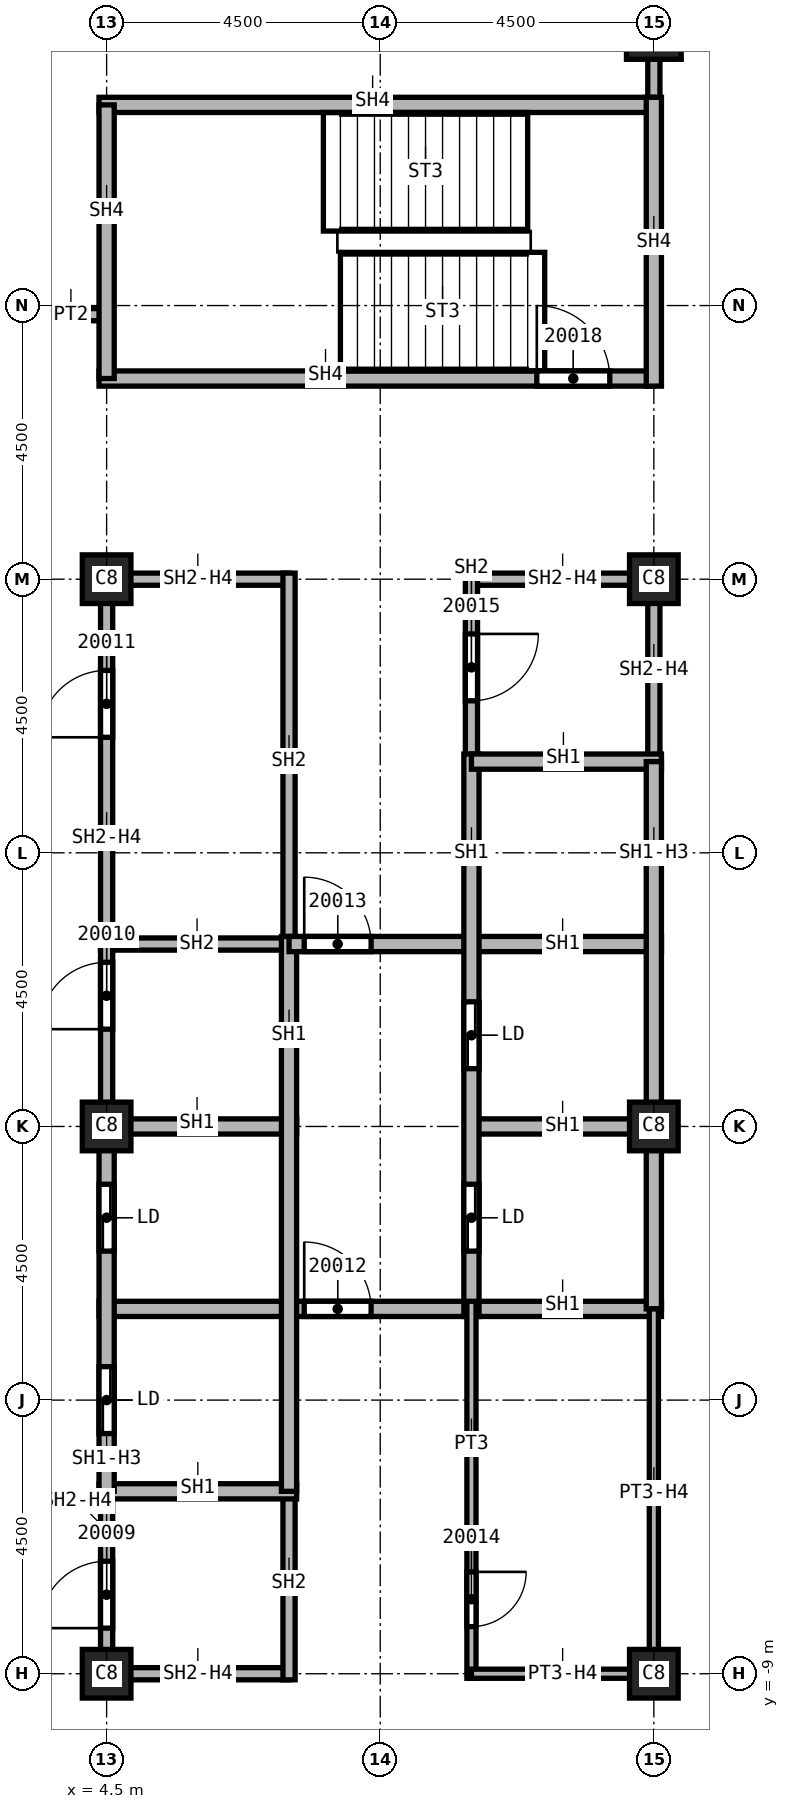
"""IFC4 building model, lengths in metres.
Left out: names, types, materials, properties, quantities, classifications, styles, units other than length and angle.
Written with IfcOpenShell. Run it as: python <this file> out.ifc"""

import sys

from ifc_helpers import new_model, si_unit, direction, frame, frame_2d, origin, origin_2d, place, context, subcontext, project, spatial, rectangle, extrude, element, fill, save


model = new_model("IFC4")
c1 = context("Model", 3, precision=1e-05, world=origin(), true_north=direction((0.0, 1.0)))
c2 = subcontext(c1, "Body", "Model", "MODEL_VIEW")
j1 = project(units=[si_unit("LENGTHUNIT", "METRE"), si_unit("PLANEANGLEUNIT", "RADIAN")], contexts=[c1])
p1 = place(None, origin())
s1 = spatial("IfcSite", under=j1, at=p1, CompositionType="ELEMENT")
p2 = place(p1, origin())
s2 = spatial("IfcBuilding", under=s1, at=p2, CompositionType="ELEMENT")
p3 = place(p2, frame((0.0, 0.0, 286.0)))
s3 = spatial("IfcBuildingStorey", under=s2, at=p3, CompositionType="ELEMENT", Elevation=286.0)
p4 = place(p3, frame((13.5, 18.0, 0.0), z_axis=(0.0, 0.0, 1.0), x_axis=(1.0, 0.0, 0.0)))
e1 = element("IfcColumn", 1, at=p4, inside=s3, PredefinedType="COLUMN", context=c2, shape_type="SweptSolid", body=[
    extrude(rectangle(XDim=0.9, YDim=0.9, at=origin_2d()), origin(), (0.0, 0.0, 1.0), 3.72),
])
for number, where, z_axis, x_axis in (
    (2, (4.5, 0.0, 0.0), (0.0, 0.0, 1.0), (1.0, 0.0, 0.0)),
    (3, (4.5, 9.0, 0.0), (0.0, 0.0, 1.0), (1.0, 0.0, 0.0)),
    (4, (4.5, -9.0, 0.0), (0.0, 0.0, 1.0), (1.0, 0.0, 0.0)),
    (5, (13.5, 0.0, 0.0), (0.0, 0.0, 1.0), (1.0, 0.0, 0.0)),
    (6, (13.5, 9.0, 0.0), (0.0, 0.0, 1.0), (1.0, 0.0, 0.0)),
    (7, (13.5, -9.0, 0.0), (0.0, 0.0, 1.0), (1.0, 0.0, 0.0)),
):
    element("IfcColumn", number, at=place(p3, frame(where, z_axis=z_axis, x_axis=x_axis)), inside=s3, PredefinedType="COLUMN", context=c2, shape_type="SweptSolid", body=[
        extrude(rectangle(XDim=0.8, YDim=0.8, at=origin_2d()), origin(), (0.0, 0.0, 1.0), 3.72),
    ])
p5 = place(p3, frame((3.45, 13.35, 0.0), z_axis=(0.0, 0.0, 1.0), x_axis=(1.0, 0.0, 0.0)))
e8 = element("IfcWall", 8, at=p5, inside=s3, PredefinedType="PARTITIONING", context=c2, shape_type="SweptSolid", body=[
    extrude(rectangle(XDim=1.049, YDim=0.2, at=frame_2d((0.524, 0.0))), origin(), (0.0, 0.0, 1.0), 3.72),
])
p6 = place(p3, frame((13.5, 16.675, 0.0), z_axis=(0.0, 0.0, 1.0), x_axis=(0.0, 1.0, 0.0)))
e9 = element("IfcWall", 9, at=p6, inside=s3, PredefinedType="PARTITIONING", context=c2, shape_type="SweptSolid", body=[
    extrude(rectangle(XDim=5.225, YDim=0.2, at=frame_2d((2.612, 0.0))), origin(), (0.0, 0.0, 1.0), 3.72),
])
p7 = place(p6, frame((2.2, 0.0, 0.0)))
e10 = element("IfcOpeningElement", 10, at=p7, cuts=e9, PredefinedType="OPENING", context=c2, shape_type="SweptSolid", body=[
    extrude(rectangle(XDim=1.0, YDim=2.1, at=frame_2d((0.5, 1.05))), frame((0.0, 0.1, 0.0), z_axis=(0.0, -1.0, 0.0), x_axis=(1.0, 0.0, 0.0)), (0.0, 0.0, 1.0), 0.2),
])
p8 = place(p3, frame((4.4, 3.0, 0.0), z_axis=(0.0, 0.0, 1.0), x_axis=(1.0, 0.0, 0.0)))
e11 = element("IfcWall", 11, at=p8, inside=s3, PredefinedType="SOLIDWALL", context=c2, shape_type="SweptSolid", body=[
    extrude(rectangle(XDim=3.225, YDim=0.2, at=frame_2d((1.613, 0.0))), origin(), (0.0, 0.0, 1.0), 3.72),
])
p9 = place(p3, frame((4.5, -9.1, 0.0), z_axis=(0.0, 0.0, 1.0), x_axis=(0.0, 1.0, 0.0)))
e12 = element("IfcWall", 12, at=p9, inside=s3, PredefinedType="SOLIDWALL", context=c2, shape_type="SweptSolid", body=[
    extrude(rectangle(XDim=3.1, YDim=0.2, at=frame_2d((1.55, 0.0))), origin(), (0.0, 0.0, 1.0), 3.042),
])
p10 = place(p9, frame((0.85, 0.0, 0.0)))
e13 = element("IfcOpeningElement", 13, at=p10, cuts=e12, PredefinedType="OPENING", context=c2, shape_type="SweptSolid", body=[
    extrude(rectangle(XDim=1.1, YDim=2.1, at=frame_2d((0.55, 1.05))), frame((0.0, 0.1, 0.0), z_axis=(0.0, -1.0, 0.0), x_axis=(1.0, 0.0, 0.0)), (0.0, 0.0, 1.0), 0.2),
])
p11 = place(p3, frame((4.5, 0.0, 0.0), z_axis=(0.0, 0.0, 1.0), x_axis=(0.0, 1.0, 0.0)))
e14 = element("IfcWall", 14, at=p11, inside=s3, PredefinedType="SOLIDWALL", context=c2, shape_type="SweptSolid", body=[
    extrude(rectangle(XDim=9.1, YDim=0.2, at=frame_2d((4.55, 0.0))), origin(), (0.0, 0.0, 1.0), 3.042),
])
p12 = place(p11, frame((1.6, 0.0, 0.0)))
e15 = element("IfcOpeningElement", 15, at=p12, cuts=e14, PredefinedType="OPENING", context=c2, shape_type="SweptSolid", body=[
    extrude(rectangle(XDim=1.1, YDim=2.1, at=frame_2d((0.55, 1.05))), frame((0.0, 0.1, 0.0), z_axis=(0.0, -1.0, 0.0), x_axis=(1.0, 0.0, 0.0)), (0.0, 0.0, 1.0), 0.2),
])
p13 = place(p11, frame((6.4, 0.0, 0.0)))
e16 = element("IfcOpeningElement", 16, at=p13, cuts=e14, PredefinedType="OPENING", context=c2, shape_type="SweptSolid", body=[
    extrude(rectangle(XDim=1.1, YDim=2.1, at=frame_2d((0.55, 1.05))), frame((0.0, 0.1, 0.0), z_axis=(0.0, -1.0, 0.0), x_axis=(1.0, 0.0, 0.0)), (0.0, 0.0, 1.0), 0.2),
])
for number, where, z_axis, x_axis in (
    (17, (4.5, 9.0, 0.0), (0.0, 0.0, 1.0), (1.0, 0.0, 0.0)),
    (18, (7.5, -9.0, 0.0), (0.0, 0.0, 1.0), (-1.0, 0.0, 0.0)),
):
    element("IfcWall", number, at=place(p3, frame(where, z_axis=z_axis, x_axis=x_axis)), inside=s3, PredefinedType="SOLIDWALL", context=c2, shape_type="SweptSolid", body=[
        extrude(rectangle(XDim=3.0, YDim=0.2, at=frame_2d((1.5, 0.0))), origin(), (0.0, 0.0, 1.0), 3.042),
    ])
p14 = place(p3, frame((7.5, -6.0, 0.0), z_axis=(0.0, 0.0, 1.0), x_axis=(0.0, -1.0, 0.0)))
e19 = element("IfcWall", 19, at=p14, inside=s3, PredefinedType="SOLIDWALL", context=c2, shape_type="SweptSolid", body=[
    extrude(rectangle(XDim=3.1, YDim=0.2, at=frame_2d((1.55, 0.0))), origin(), (0.0, 0.0, 1.0), 3.72),
])
p15 = place(p3, frame((7.5, 9.1, 0.0), z_axis=(0.0, 0.0, 1.0), x_axis=(0.0, -1.0, 0.0)))
e20 = element("IfcWall", 20, at=p15, inside=s3, PredefinedType="SOLIDWALL", context=c2, shape_type="SweptSolid", body=[
    extrude(rectangle(XDim=6.225, YDim=0.2, at=frame_2d((3.113, 0.0))), origin(), (0.0, 0.0, 1.0), 3.72),
])
p16 = place(p3, frame((10.5, 9.0, 0.0), z_axis=(0.0, 0.0, 1.0), x_axis=(1.0, 0.0, 0.0)))
e21 = element("IfcWall", 21, at=p16, inside=s3, PredefinedType="SOLIDWALL", context=c2, shape_type="SweptSolid", body=[
    extrude(rectangle(XDim=3.0, YDim=0.2, at=frame_2d((1.5, 0.0))), origin(), (0.0, 0.0, 1.0), 3.042),
])
p17 = place(p3, frame((10.5, 9.1, 0.0), z_axis=(0.0, 0.0, 1.0), x_axis=(0.0, -1.0, 0.0)))
e22 = element("IfcWall", 22, at=p17, inside=s3, PredefinedType="SOLIDWALL", context=c2, shape_type="SweptSolid", body=[
    extrude(rectangle(XDim=3.225, YDim=0.2, at=frame_2d((1.613, 0.0))), origin(), (0.0, 0.0, 1.0), 3.72),
])
p18 = place(p17, frame((1.0, 0.0, 0.0)))
e23 = element("IfcOpeningElement", 23, at=p18, cuts=e22, PredefinedType="OPENING", context=c2, shape_type="SweptSolid", body=[
    extrude(rectangle(XDim=1.1, YDim=2.1, at=frame_2d((0.55, 1.05))), frame((0.0, 0.1, 0.0), z_axis=(0.0, -1.0, 0.0), x_axis=(1.0, 0.0, 0.0)), (0.0, 0.0, 1.0), 0.2),
])
p19 = place(p3, frame((13.5, 9.1, 0.0), z_axis=(0.0, 0.0, 1.0), x_axis=(0.0, -1.0, 0.0)))
e24 = element("IfcWall", 24, at=p19, inside=s3, PredefinedType="SOLIDWALL", context=c2, shape_type="SweptSolid", body=[
    extrude(rectangle(XDim=3.1, YDim=0.2, at=frame_2d((1.55, 0.0))), origin(), (0.0, 0.0, 1.0), 3.042),
])
p20 = place(p3, frame((4.375, -6.0, 0.0), z_axis=(0.0, 0.0, 1.0), x_axis=(1.0, 0.0, 0.0)))
e25 = element("IfcWall", 25, at=p20, inside=s3, PredefinedType="SOLIDWALL", context=c2, shape_type="SweptSolid", body=[
    extrude(rectangle(XDim=3.25, YDim=0.25, at=frame_2d((1.625, 0.0))), origin(), (0.0, 0.0, 1.0), 3.72),
])
p21 = place(p3, frame((4.375, -3.0, 0.0), z_axis=(0.0, 0.0, 1.0), x_axis=(1.0, 0.0, 0.0)))
e26 = element("IfcWall", 26, at=p21, inside=s3, PredefinedType="SOLIDWALL", context=c2, shape_type="SweptSolid", body=[
    extrude(rectangle(XDim=9.25, YDim=0.25, at=frame_2d((4.625, 0.0))), origin(), (0.0, 0.0, 1.0), 3.72),
])
p22 = place(p21, frame((3.375, 0.0, 0.0)))
e27 = element("IfcOpeningElement", 27, at=p22, cuts=e26, PredefinedType="OPENING", context=c2, shape_type="SweptSolid", body=[
    extrude(rectangle(XDim=1.1, YDim=2.1, at=frame_2d((0.55, 1.05))), frame((0.0, 0.125, 0.0), z_axis=(0.0, -1.0, 0.0), x_axis=(1.0, 0.0, 0.0)), (0.0, 0.0, 1.0), 0.25),
])
p23 = place(p3, frame((4.375, 0.0, 0.0), z_axis=(0.0, 0.0, 1.0), x_axis=(1.0, 0.0, 0.0)))
e28 = element("IfcWall", 28, at=p23, inside=s3, PredefinedType="SOLIDWALL", context=c2, shape_type="SweptSolid", body=[
    extrude(rectangle(XDim=3.25, YDim=0.25, at=frame_2d((1.625, 0.0))), origin(), (0.0, 0.0, 1.0), 3.72),
])
p24 = place(p3, frame((4.5, -6.0, 0.0), z_axis=(0.0, 0.0, 1.0), x_axis=(0.0, 1.0, 0.0)))
e29 = element("IfcWall", 29, at=p24, inside=s3, PredefinedType="SOLIDWALL", context=c2, shape_type="SweptSolid", body=[
    extrude(rectangle(XDim=6.0, YDim=0.25, at=frame_2d((3.0, 0.0))), origin(), (0.0, 0.0, 1.0), 3.042),
])
p25 = place(p24, frame((0.95, 0.0, 0.0)))
e30 = element("IfcOpeningElement", 30, at=p25, cuts=e29, PredefinedType="OPENING", context=c2, shape_type="SweptSolid", body=[
    extrude(rectangle(XDim=1.1, YDim=2.1, at=frame_2d((0.55, 1.05))), frame((0.0, 0.125, 0.0), z_axis=(0.0, -1.0, 0.0), x_axis=(1.0, 0.0, 0.0)), (0.0, 0.0, 1.0), 0.25),
])
p26 = place(p24, frame((3.95, 0.0, 0.0)))
e31 = element("IfcOpeningElement", 31, at=p26, cuts=e29, PredefinedType="OPENING", context=c2, shape_type="SweptSolid", body=[
    extrude(rectangle(XDim=1.1, YDim=2.1, at=frame_2d((0.55, 1.05))), frame((0.0, 0.125, 0.0), z_axis=(0.0, -1.0, 0.0), x_axis=(1.0, 0.0, 0.0)), (0.0, 0.0, 1.0), 0.25),
])
p27 = place(p3, frame((7.5, 3.125, 0.0), z_axis=(0.0, 0.0, 1.0), x_axis=(0.0, -1.0, 0.0)))
e32 = element("IfcWall", 32, at=p27, inside=s3, PredefinedType="SOLIDWALL", context=c2, shape_type="SweptSolid", body=[
    extrude(rectangle(XDim=9.125, YDim=0.25, at=frame_2d((4.562, 0.0))), origin(), (0.0, 0.0, 1.0), 3.72),
])
p28 = place(p3, frame((7.5, 3.0, 0.0), z_axis=(0.0, 0.0, 1.0), x_axis=(1.0, 0.0, 0.0)))
e33 = element("IfcWall", 33, at=p28, inside=s3, PredefinedType="SOLIDWALL", context=c2, shape_type="SweptSolid", body=[
    extrude(rectangle(XDim=6.125, YDim=0.25, at=frame_2d((3.062, 0.0))), origin(), (0.0, 0.0, 1.0), 3.72),
])
p29 = place(p28, frame((0.25, 0.0, 0.0)))
e34 = element("IfcOpeningElement", 34, at=p29, cuts=e33, PredefinedType="OPENING", context=c2, shape_type="SweptSolid", body=[
    extrude(rectangle(XDim=1.1, YDim=2.1, at=frame_2d((0.55, 1.05))), frame((0.0, 0.125, 0.0), z_axis=(0.0, -1.0, 0.0), x_axis=(1.0, 0.0, 0.0)), (0.0, 0.0, 1.0), 0.25),
])
p30 = place(p3, frame((10.5, 0.0, 0.0), z_axis=(0.0, 0.0, 1.0), x_axis=(1.0, 0.0, 0.0)))
e35 = element("IfcWall", 35, at=p30, inside=s3, PredefinedType="SOLIDWALL", context=c2, shape_type="SweptSolid", body=[
    extrude(rectangle(XDim=3.125, YDim=0.25, at=frame_2d((1.562, 0.0))), origin(), (0.0, 0.0, 1.0), 3.72),
])
p31 = place(p3, frame((10.5, 6.125, 0.0), z_axis=(0.0, 0.0, 1.0), x_axis=(0.0, -1.0, 0.0)))
e36 = element("IfcWall", 36, at=p31, inside=s3, PredefinedType="SOLIDWALL", context=c2, shape_type="SweptSolid", body=[
    extrude(rectangle(XDim=9.25, YDim=0.25, at=frame_2d((4.625, 0.0))), origin(), (0.0, 0.0, 1.0), 3.72),
])
p32 = place(p31, frame((7.075, 0.0, 0.0)))
e37 = element("IfcOpeningElement", 37, at=p32, cuts=e36, PredefinedType="OPENING", context=c2, shape_type="SweptSolid", body=[
    extrude(rectangle(XDim=1.1, YDim=2.1, at=frame_2d((0.55, 1.05))), frame((0.0, 0.125, 0.0), z_axis=(0.0, -1.0, 0.0), x_axis=(1.0, 0.0, 0.0)), (0.0, 0.0, 1.0), 0.25),
])
p33 = place(p31, frame((4.075, 0.0, 0.0)))
e38 = element("IfcOpeningElement", 38, at=p33, cuts=e36, PredefinedType="OPENING", context=c2, shape_type="SweptSolid", body=[
    extrude(rectangle(XDim=1.1, YDim=2.1, at=frame_2d((0.55, 1.05))), frame((0.0, 0.125, 0.0), z_axis=(0.0, -1.0, 0.0), x_axis=(1.0, 0.0, 0.0)), (0.0, 0.0, 1.0), 0.25),
])
p34 = place(p3, frame((10.5, 6.0, 0.0), z_axis=(0.0, 0.0, 1.0), x_axis=(1.0, 0.0, 0.0)))
e39 = element("IfcWall", 39, at=p34, inside=s3, PredefinedType="SOLIDWALL", context=c2, shape_type="SweptSolid", body=[
    extrude(rectangle(XDim=3.125, YDim=0.25, at=frame_2d((1.562, 0.0))), origin(), (0.0, 0.0, 1.0), 3.72),
])
p35 = place(p3, frame((13.5, 6.0, 0.0), z_axis=(0.0, 0.0, 1.0), x_axis=(0.0, -1.0, 0.0)))
e40 = element("IfcWall", 40, at=p35, inside=s3, PredefinedType="SOLIDWALL", context=c2, shape_type="SweptSolid", body=[
    extrude(rectangle(XDim=9.0, YDim=0.25, at=frame_2d((4.5, 0.0))), origin(), (0.0, 0.0, 1.0), 3.042),
])
p36 = place(p3, frame((4.375, 12.3, 0.0), z_axis=(0.0, 0.0, 1.0), x_axis=(1.0, 0.0, 0.0)))
e41 = element("IfcWall", 41, at=p36, inside=s3, PredefinedType="SOLIDWALL", context=c2, shape_type="SweptSolid", body=[
    extrude(rectangle(XDim=9.125, YDim=0.25, at=frame_2d((4.562, 0.0))), origin(), (0.0, 0.0, 1.0), 3.72),
])
p37 = place(p36, frame((7.2, 0.0, 0.0)))
e42 = element("IfcOpeningElement", 42, at=p37, cuts=e41, PredefinedType="OPENING", context=c2, shape_type="SweptSolid", body=[
    extrude(rectangle(XDim=1.2, YDim=2.1, at=frame_2d((0.6, 1.05))), frame((0.0, 0.125, 0.0), z_axis=(0.0, -1.0, 0.0), x_axis=(1.0, 0.0, 0.0)), (0.0, 0.0, 1.0), 0.25),
])
p38 = place(p3, frame((4.375, 16.8, 0.0), z_axis=(0.0, 0.0, 1.0), x_axis=(1.0, 0.0, 0.0)))
e43 = element("IfcWall", 43, at=p38, inside=s3, PredefinedType="SOLIDWALL", context=c2, shape_type="SweptSolid", body=[
    extrude(rectangle(XDim=9.125, YDim=0.25, at=frame_2d((4.562, 0.0))), origin(), (0.0, 0.0, 1.0), 3.72),
])
p39 = place(p3, frame((4.5, 12.3, 0.0), z_axis=(0.0, 0.0, 1.0), x_axis=(0.0, 1.0, 0.0)))
e44 = element("IfcWall", 44, at=p39, inside=s3, PredefinedType="SOLIDWALL", context=c2, shape_type="SweptSolid", body=[
    extrude(rectangle(XDim=4.5, YDim=0.25, at=frame_2d((2.25, 0.0))), origin(), (0.0, 0.0, 1.0), 3.72),
])
p40 = place(p3, frame((13.5, 12.175, 0.0), z_axis=(0.0, 0.0, 1.0), x_axis=(0.0, 1.0, 0.0)))
e45 = element("IfcWall", 45, at=p40, inside=s3, PredefinedType="SOLIDWALL", context=c2, shape_type="SweptSolid", body=[
    extrude(rectangle(XDim=4.75, YDim=0.25, at=frame_2d((2.375, 0.0))), origin(), (0.0, 0.0, 1.0), 3.72),
])
p41 = place(p3, frame((10.5, -2.875, 0.0), z_axis=(0.0, 0.0, 1.0), x_axis=(0.0, -1.0, 0.0)))
e46 = element("IfcWall", 46, at=p41, inside=s3, PredefinedType="PARTITIONING", context=c2, shape_type="SweptSolid", body=[
    extrude(rectangle(XDim=6.2, YDim=0.15, at=frame_2d((3.1, 0.0))), origin(), (0.0, 0.0, 1.0), 3.72),
])
p42 = place(p41, frame((4.45, 0.0, 0.0)))
e47 = element("IfcOpeningElement", 47, at=p42, cuts=e46, PredefinedType="OPENING", context=c2, shape_type="SweptSolid", body=[
    extrude(rectangle(XDim=0.9, YDim=2.1, at=frame_2d((0.45, 1.05))), frame((0.0, 0.075, 0.0), z_axis=(0.0, -1.0, 0.0), x_axis=(1.0, 0.0, 0.0)), (0.0, 0.0, 1.0), 0.15),
])
p43 = place(p3, frame((13.5, -9.0, 0.0), z_axis=(0.0, 0.0, 1.0), x_axis=(-1.0, 0.0, 0.0)))
e48 = element("IfcWall", 48, at=p43, inside=s3, PredefinedType="PARTITIONING", context=c2, shape_type="SweptSolid", body=[
    extrude(rectangle(XDim=3.0, YDim=0.15, at=frame_2d((1.5, 0.0))), origin(), (0.0, 0.0, 1.0), 3.042),
])
p44 = place(p3, frame((13.5, -3.0, 0.0), z_axis=(0.0, 0.0, 1.0), x_axis=(0.0, -1.0, 0.0)))
e49 = element("IfcWall", 49, at=p44, inside=s3, PredefinedType="PARTITIONING", context=c2, shape_type="SweptSolid", body=[
    extrude(rectangle(XDim=6.075, YDim=0.15, at=frame_2d((3.038, 0.0))), origin(), (0.0, 0.0, 1.0), 3.042),
])
p45 = place(p10, origin())
e50 = element("IfcDoor", 50, at=p45, inside=s3, OperationType="SINGLE_SWING_RIGHT", PredefinedType="DOOR", context=c2, shape_type="SweptSolid", body=[
    extrude(rectangle(XDim=1.1, YDim=2.1, at=frame_2d((0.55, 1.05))), frame((0.0, 0.025, 0.0), z_axis=(0.0, -1.0, 0.0), x_axis=(1.0, 0.0, 0.0)), (0.0, 0.0, 1.0), 0.05),
])
fill(e13, e50)
p46 = place(p12, origin())
e51 = element("IfcDoor", 51, at=p46, inside=s3, OperationType="SINGLE_SWING_LEFT", PredefinedType="DOOR", context=c2, shape_type="SweptSolid", body=[
    extrude(rectangle(XDim=1.1, YDim=2.1, at=frame_2d((0.55, 1.05))), frame((0.0, 0.025, 0.0), z_axis=(0.0, -1.0, 0.0), x_axis=(1.0, 0.0, 0.0)), (0.0, 0.0, 1.0), 0.05),
])
fill(e15, e51)
p47 = place(p13, origin())
e52 = element("IfcDoor", 52, at=p47, inside=s3, OperationType="SINGLE_SWING_RIGHT", PredefinedType="DOOR", context=c2, shape_type="SweptSolid", body=[
    extrude(rectangle(XDim=1.1, YDim=2.1, at=frame_2d((0.55, 1.05))), frame((0.0, 0.025, 0.0), z_axis=(0.0, -1.0, 0.0), x_axis=(1.0, 0.0, 0.0)), (0.0, 0.0, 1.0), 0.05),
])
fill(e16, e52)
p48 = place(p22, origin())
e53 = element("IfcDoor", 53, at=p48, inside=s3, OperationType="SINGLE_SWING_LEFT", PredefinedType="DOOR", context=c2, shape_type="SweptSolid", body=[
    extrude(rectangle(XDim=1.1, YDim=2.1, at=frame_2d((0.55, 1.05))), frame((0.0, 0.025, 0.0), z_axis=(0.0, -1.0, 0.0), x_axis=(1.0, 0.0, 0.0)), (0.0, 0.0, 1.0), 0.05),
])
fill(e27, e53)
p49 = place(p29, origin())
e54 = element("IfcDoor", 54, at=p49, inside=s3, OperationType="SINGLE_SWING_RIGHT", PredefinedType="DOOR", context=c2, shape_type="SweptSolid", body=[
    extrude(rectangle(XDim=1.1, YDim=2.1, at=frame_2d((0.55, 1.05))), frame((0.0, 0.025, 0.0), z_axis=(0.0, -1.0, 0.0), x_axis=(1.0, 0.0, 0.0)), (0.0, 0.0, 1.0), 0.05),
])
fill(e34, e54)
p50 = place(p42, origin())
e55 = element("IfcDoor", 55, at=p50, inside=s3, OperationType="SINGLE_SWING_LEFT", PredefinedType="DOOR", context=c2, shape_type="SweptSolid", body=[
    extrude(rectangle(XDim=0.9, YDim=2.1, at=frame_2d((0.45, 1.05))), frame((0.0, 0.025, 0.0), z_axis=(0.0, -1.0, 0.0), x_axis=(1.0, 0.0, 0.0)), (0.0, 0.0, 1.0), 0.05),
])
fill(e47, e55)
p51 = place(p18, origin())
e56 = element("IfcDoor", 56, at=p51, inside=s3, OperationType="SINGLE_SWING_RIGHT", PredefinedType="DOOR", context=c2, shape_type="SweptSolid", body=[
    extrude(rectangle(XDim=1.1, YDim=2.1, at=frame_2d((0.55, 1.05))), frame((0.0, 0.025, 0.0), z_axis=(0.0, -1.0, 0.0), x_axis=(1.0, 0.0, 0.0)), (0.0, 0.0, 1.0), 0.05),
])
fill(e23, e56)
p52 = place(p37, origin())
e57 = element("IfcDoor", 57, at=p52, inside=s3, OperationType="SINGLE_SWING_LEFT", PredefinedType="DOOR", context=c2, shape_type="SweptSolid", body=[
    extrude(rectangle(XDim=1.2, YDim=2.1, at=frame_2d((0.6, 1.05))), frame((0.0, 0.025, 0.0), z_axis=(0.0, -1.0, 0.0), x_axis=(1.0, 0.0, 0.0)), (0.0, 0.0, 1.0), 0.05),
])
fill(e42, e57)
p53 = place(p25, origin())
e58 = element("IfcDoor", 58, at=p53, inside=s3, OperationType="SLIDING_TO_LEFT", PredefinedType="DOOR", context=c2, shape_type="SweptSolid", body=[
    extrude(rectangle(XDim=1.1, YDim=2.1, at=frame_2d((0.55, 1.05))), frame((0.0, 0.025, 0.0), z_axis=(0.0, -1.0, 0.0), x_axis=(1.0, 0.0, 0.0)), (0.0, 0.0, 1.0), 0.05),
])
fill(e30, e58)
p54 = place(p26, origin())
e59 = element("IfcDoor", 59, at=p54, inside=s3, OperationType="SLIDING_TO_LEFT", PredefinedType="DOOR", context=c2, shape_type="SweptSolid", body=[
    extrude(rectangle(XDim=1.1, YDim=2.1, at=frame_2d((0.55, 1.05))), frame((0.0, 0.025, 0.0), z_axis=(0.0, -1.0, 0.0), x_axis=(1.0, 0.0, 0.0)), (0.0, 0.0, 1.0), 0.05),
])
fill(e31, e59)
p55 = place(p32, origin())
e60 = element("IfcDoor", 60, at=p55, inside=s3, OperationType="SLIDING_TO_LEFT", PredefinedType="DOOR", context=c2, shape_type="SweptSolid", body=[
    extrude(rectangle(XDim=1.1, YDim=2.1, at=frame_2d((0.55, 1.05))), frame((0.0, 0.025, 0.0), z_axis=(0.0, -1.0, 0.0), x_axis=(1.0, 0.0, 0.0)), (0.0, 0.0, 1.0), 0.05),
])
fill(e37, e60)
p56 = place(p33, origin())
e61 = element("IfcDoor", 61, at=p56, inside=s3, OperationType="SLIDING_TO_LEFT", PredefinedType="DOOR", context=c2, shape_type="SweptSolid", body=[
    extrude(rectangle(XDim=1.1, YDim=2.1, at=frame_2d((0.55, 1.05))), frame((0.0, 0.025, 0.0), z_axis=(0.0, -1.0, 0.0), x_axis=(1.0, 0.0, 0.0)), (0.0, 0.0, 1.0), 0.05),
])
fill(e38, e61)
save(model, sys.argv[1])
